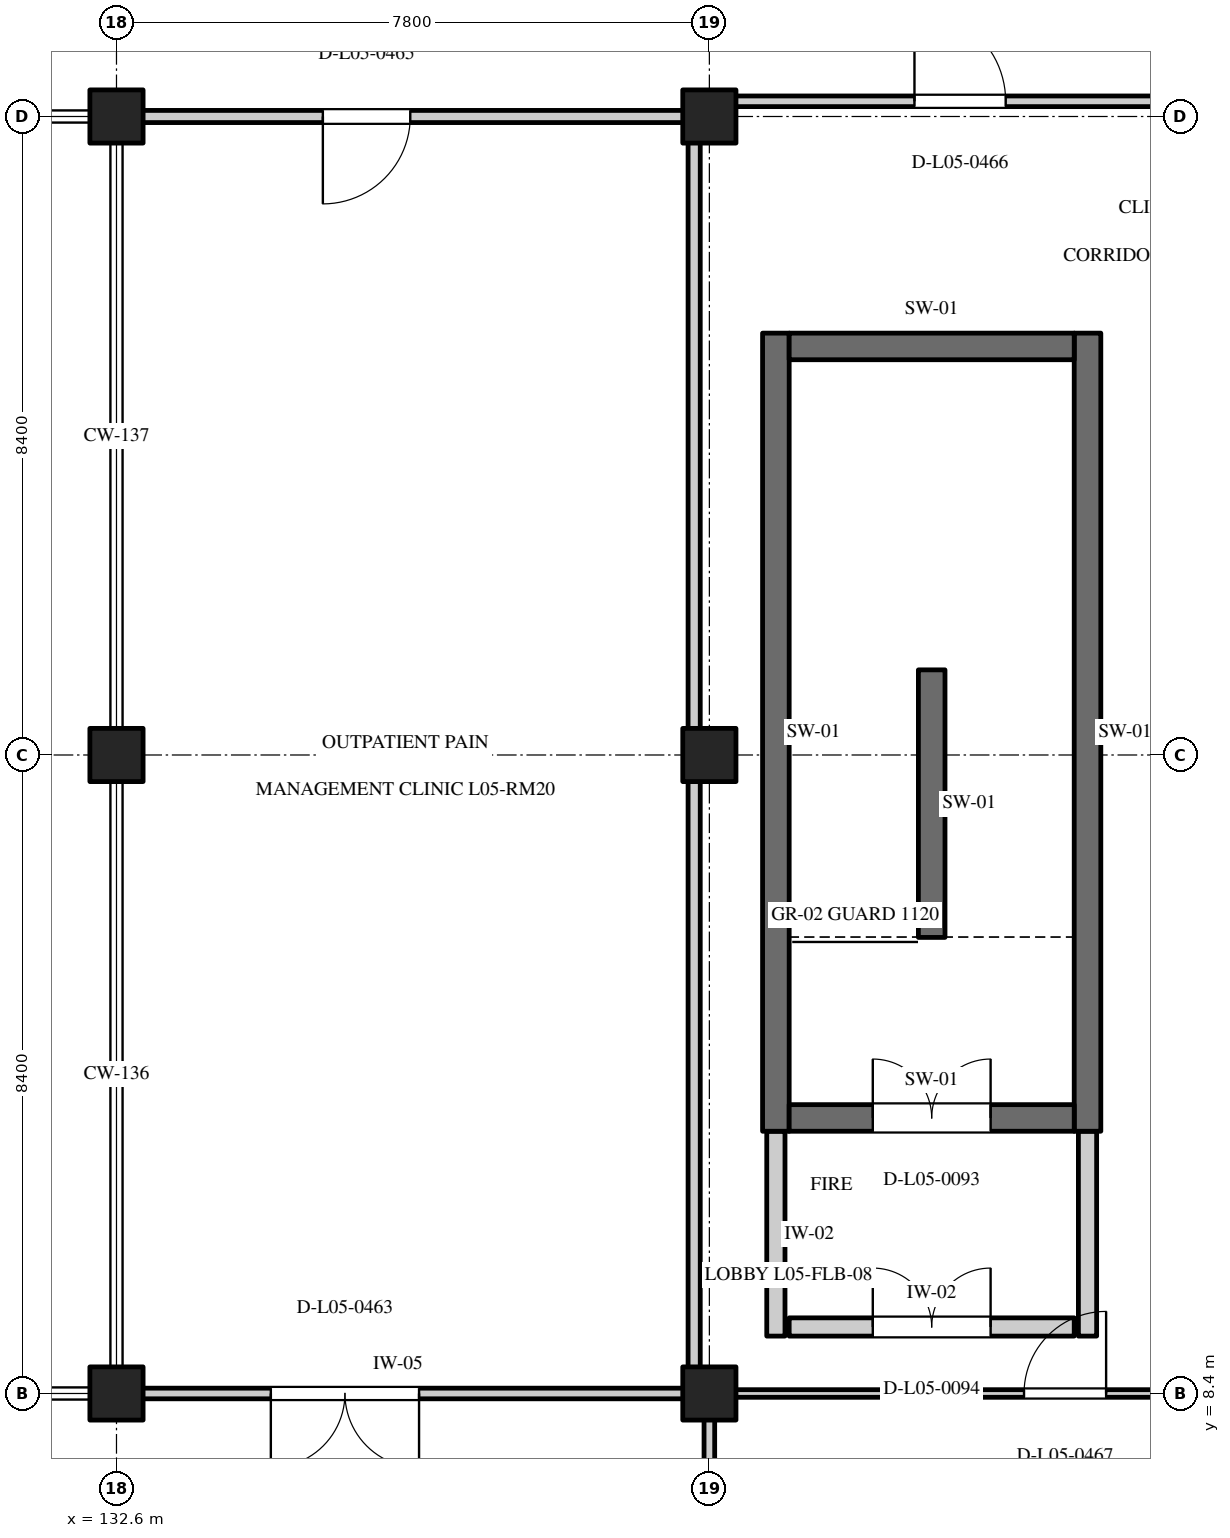
"""IFC4 building model, lengths in metres.
Left out: names, types, materials, properties, quantities, classifications, styles, units other than length and angle.
Written with IfcOpenShell. Run it as: python <this file> out.ifc"""

import sys

from ifc_helpers import new_model, si_unit, direction, frame, frame_2d, origin, origin_2d, place, context, subcontext, project, spatial, rectangle, extrude, element, fill, save


model = new_model("IFC4")
c1 = context("Model", 3, precision=1e-05, world=origin(), true_north=direction((0.0, 1.0)))
c2 = subcontext(c1, "Body", "Model", "MODEL_VIEW")
j1 = project(units=[si_unit("LENGTHUNIT", "METRE"), si_unit("PLANEANGLEUNIT", "RADIAN")], contexts=[c1])
p1 = place(None, origin())
s1 = spatial("IfcSite", under=j1, at=p1, CompositionType="ELEMENT")
p2 = place(p1, origin())
s2 = spatial("IfcBuilding", under=s1, at=p2, CompositionType="ELEMENT")
p3 = place(p2, frame((0.0, 0.0, 22.2)))
s3 = spatial("IfcBuildingStorey", under=s2, at=p3, CompositionType="ELEMENT", Elevation=22.2)
for number, where, z_axis, x_axis in (
    (1, (132.6, 8.4, 0.0), (0.0, 0.0, 1.0), (1.0, 0.0, 0.0)),
    (2, (132.6, 16.8, 0.0), (0.0, 0.0, 1.0), (1.0, 0.0, 0.0)),
    (3, (132.6, 25.2, 0.0), (0.0, 0.0, 1.0), (1.0, 0.0, 0.0)),
    (4, (140.4, 8.4, 0.0), (0.0, 0.0, 1.0), (1.0, 0.0, 0.0)),
    (5, (140.4, 16.8, 0.0), (0.0, 0.0, 1.0), (1.0, 0.0, 0.0)),
    (6, (140.4, 25.2, 0.0), (0.0, 0.0, 1.0), (1.0, 0.0, 0.0)),
):
    element("IfcColumn", number, at=place(p3, frame(where, z_axis=z_axis, x_axis=x_axis)), inside=s3, PredefinedType="COLUMN", context=c2, shape_type="SweptSolid", body=[
        extrude(rectangle(XDim=0.7, YDim=0.7, at=origin_2d()), origin(), (0.0, 0.0, 1.0), 3.9),
    ])
for number, where, z_axis, x_axis in (
    (7, (141.275, 11.85, 0.0), (0.0, 0.0, 1.0), (0.0, 1.0, 0.0)),
    (8, (145.375, 11.85, 0.0), (0.0, 0.0, 1.0), (0.0, 1.0, 0.0)),
):
    element("IfcWall", number, at=place(p3, frame(where, z_axis=z_axis, x_axis=x_axis)), inside=s3, PredefinedType="SHEAR", context=c2, shape_type="SweptSolid", body=[
        extrude(rectangle(XDim=10.5, YDim=0.35, at=frame_2d((5.25, 0.0))), origin(), (0.0, 0.0, 1.0), 3.6),
    ])
p4 = place(p3, frame((141.45, 22.175, 0.0), z_axis=(0.0, 0.0, 1.0), x_axis=(1.0, 0.0, 0.0)))
e9 = element("IfcWall", 9, at=p4, inside=s3, PredefinedType="SHEAR", context=c2, shape_type="SweptSolid", body=[
    extrude(rectangle(XDim=3.75, YDim=0.35, at=frame_2d((1.875, 0.0))), origin(), (0.0, 0.0, 1.0), 3.6),
])
p5 = place(p3, frame((141.45, 12.025, 0.0), z_axis=(0.0, 0.0, 1.0), x_axis=(1.0, 0.0, 0.0)))
e10 = element("IfcWall", 10, at=p5, inside=s3, PredefinedType="SHEAR", context=c2, shape_type="SweptSolid", body=[
    extrude(rectangle(XDim=3.75, YDim=0.35, at=frame_2d((1.875, 0.0))), origin(), (0.0, 0.0, 1.0), 3.6),
])
p6 = place(p5, frame((1.1, 0.0, 0.0)))
e11 = element("IfcOpeningElement", 11, at=p6, cuts=e10, PredefinedType="OPENING", context=c2, shape_type="SweptSolid", body=[
    extrude(rectangle(XDim=1.55, YDim=2.25, at=frame_2d((0.775, 1.125))), frame((0.0, 0.187, 0.0), z_axis=(0.0, -1.0, 0.0), x_axis=(1.0, 0.0, 0.0)), (0.0, 0.0, 1.0), 0.374),
])
for number, where, z_axis, x_axis in (
    (12, (141.275, 9.155, 0.0), (0.0, 0.0, 1.0), (0.0, 1.0, 0.0)),
    (13, (145.375, 9.155, 0.0), (0.0, 0.0, 1.0), (0.0, 1.0, 0.0)),
):
    element("IfcWall", number, at=place(p3, frame(where, z_axis=z_axis, x_axis=x_axis)), inside=s3, PredefinedType="STANDARD", context=c2, shape_type="SweptSolid", body=[
        extrude(rectangle(XDim=2.695, YDim=0.24, at=frame_2d((1.348, 0.0))), origin(), (0.0, 0.0, 1.0), 3.6),
    ])
p7 = place(p3, frame((141.45, 9.275, 0.0), z_axis=(0.0, 0.0, 1.0), x_axis=(1.0, 0.0, 0.0)))
e14 = element("IfcWall", 14, at=p7, inside=s3, PredefinedType="STANDARD", context=c2, shape_type="SweptSolid", body=[
    extrude(rectangle(XDim=3.75, YDim=0.24, at=frame_2d((1.875, 0.0))), origin(), (0.0, 0.0, 1.0), 3.6),
])
p8 = place(p7, frame((1.1, 0.0, 0.0)))
e15 = element("IfcOpeningElement", 15, at=p8, cuts=e14, PredefinedType="OPENING", context=c2, shape_type="SweptSolid", body=[
    extrude(rectangle(XDim=1.55, YDim=2.25, at=frame_2d((0.775, 1.125))), frame((0.0, 0.132, 0.0), z_axis=(0.0, -1.0, 0.0), x_axis=(1.0, 0.0, 0.0)), (0.0, 0.0, 1.0), 0.264),
])
p9 = place(p3, frame((143.325, 14.4, 0.0), z_axis=(0.0, 0.0, 1.0), x_axis=(0.0, 1.0, 0.0)))
e16 = element("IfcWall", 16, at=p9, inside=s3, PredefinedType="SHEAR", context=c2, shape_type="SweptSolid", body=[
    extrude(rectangle(XDim=3.52, YDim=0.35, at=frame_2d((1.76, 0.0))), origin(), (0.0, 0.0, 1.0), 3.6),
])
p10 = place(p3, frame((132.29, 8.4, 0.0), z_axis=(0.0, 0.0, 1.0), x_axis=(1.0, 0.0, 0.0)))
e17 = element("IfcWall", 17, at=p10, inside=s3, PredefinedType="PARTITIONING", context=c2, shape_type="SweptSolid", body=[
    extrude(rectangle(XDim=8.025, YDim=0.14, at=frame_2d((4.012, 0.0))), origin(), (0.0, 0.0, 1.0), 3.58),
])
p11 = place(p10, frame((2.341, 0.0, 0.0)))
e18 = element("IfcOpeningElement", 18, at=p11, cuts=e17, PredefinedType="OPENING", context=c2, shape_type="SweptSolid", body=[
    extrude(rectangle(XDim=1.95, YDim=2.35, at=frame_2d((0.975, 1.175))), frame((0.0, 0.082, 0.0), z_axis=(0.0, -1.0, 0.0), x_axis=(1.0, 0.0, 0.0)), (0.0, 0.0, 1.0), 0.164),
])
p12 = place(p3, frame((140.4, 0.085, 0.0), z_axis=(0.0, 0.0, 1.0), x_axis=(0.0, 1.0, 0.0)))
e19 = element("IfcWall", 19, at=p12, inside=s3, PredefinedType="PARTITIONING", context=c2, shape_type="SweptSolid", body=[
    extrude(rectangle(XDim=8.23, YDim=0.14, at=frame_2d((4.115, 0.0))), origin(), (0.0, 0.0, 1.0), 3.58),
])
p13 = place(p3, frame((132.685, 25.2, 0.0), z_axis=(0.0, 0.0, 1.0), x_axis=(1.0, 0.0, 0.0)))
e20 = element("IfcWall", 20, at=p13, inside=s3, PredefinedType="PARTITIONING", context=c2, shape_type="SweptSolid", body=[
    extrude(rectangle(XDim=7.43, YDim=0.16, at=frame_2d((3.715, 0.0))), origin(), (0.0, 0.0, 1.0), 2.95),
])
p14 = place(p13, frame((2.63, 0.0, 0.0)))
e21 = element("IfcOpeningElement", 21, at=p14, cuts=e20, PredefinedType="OPENING", context=c2, shape_type="SweptSolid", body=[
    extrude(rectangle(XDim=1.15, YDim=2.15, at=frame_2d((0.575, 1.075))), frame((0.0, 0.092, 0.0), z_axis=(0.0, -1.0, 0.0), x_axis=(1.0, 0.0, 0.0)), (0.0, 0.0, 1.0), 0.184),
])
p15 = place(p3, frame((132.6, 16.49, 0.0), z_axis=(0.0, 0.0, 1.0), x_axis=(0.0, 1.0, 0.0)))
e22 = element("IfcWall", 22, at=p15, inside=s3, PredefinedType="PARTITIONING", context=c2, shape_type="SweptSolid", body=[
    extrude(rectangle(XDim=0.62, YDim=0.16, at=frame_2d((0.31, 0.0))), origin(), (0.0, 0.0, 1.0), 2.95),
])
p16 = place(p3, frame((140.2, 8.485, 0.0), z_axis=(0.0, 0.0, 1.0), x_axis=(0.0, 1.0, 0.0)))
e23 = element("IfcWall", 23, at=p16, inside=s3, PredefinedType="PARTITIONING", context=c2, shape_type="SweptSolid", body=[
    extrude(rectangle(XDim=16.63, YDim=0.16, at=frame_2d((8.315, 0.0))), origin(), (0.0, 0.0, 1.0), 3.58),
])
p17 = place(p3, frame((140.155, 25.4, 0.0), z_axis=(0.0, 0.0, 1.0), x_axis=(1.0, 0.0, 0.0)))
e24 = element("IfcWall", 24, at=p17, inside=s3, PredefinedType="PARTITIONING", context=c2, shape_type="SweptSolid", body=[
    extrude(rectangle(XDim=7.76, YDim=0.14, at=frame_2d((3.88, 0.0))), origin(), (0.0, 0.0, 1.0), 2.95),
])
p18 = place(p17, frame((2.943, 0.0, 0.0)))
e25 = element("IfcOpeningElement", 25, at=p18, cuts=e24, PredefinedType="OPENING", context=c2, shape_type="SweptSolid", body=[
    extrude(rectangle(XDim=1.2, YDim=2.15, at=frame_2d((0.6, 1.075))), frame((0.0, 0.082, 0.0), z_axis=(0.0, -1.0, 0.0), x_axis=(1.0, 0.0, 0.0)), (0.0, 0.0, 1.0), 0.164),
])
p19 = place(p3, frame((140.485, 8.4, 0.0), z_axis=(0.0, 0.0, 1.0), x_axis=(1.0, 0.0, 0.0)))
e26 = element("IfcWall", 26, at=p19, inside=s3, PredefinedType="PARTITIONING", context=c2, shape_type="SweptSolid", body=[
    extrude(rectangle(XDim=7.43, YDim=0.1, at=frame_2d((3.715, 0.0))), origin(), (0.0, 0.0, 1.0), 3.58),
])
p20 = place(p19, frame((4.055, 0.0, 0.0)))
e27 = element("IfcOpeningElement", 27, at=p20, cuts=e26, PredefinedType="OPENING", context=c2, shape_type="SweptSolid", body=[
    extrude(rectangle(XDim=1.08, YDim=2.15, at=frame_2d((0.54, 1.075))), frame((0.0, 0.062, 0.0), z_axis=(0.0, -1.0, 0.0), x_axis=(1.0, 0.0, 0.0)), (0.0, 0.0, 1.0), 0.124),
])
p21 = place(p6, origin())
e28 = element("IfcDoor", 28, at=p21, inside=s3, OperationType="DOUBLE_DOOR_SINGLE_SWING", PredefinedType="DOOR", context=c2, shape_type="SweptSolid", body=[
    extrude(rectangle(XDim=1.55, YDim=2.25, at=frame_2d((0.775, 1.125))), frame((0.0, 0.025, 0.0), z_axis=(0.0, -1.0, 0.0), x_axis=(1.0, 0.0, 0.0)), (0.0, 0.0, 1.0), 0.05),
])
fill(e11, e28)
p22 = place(p8, origin())
e29 = element("IfcDoor", 29, at=p22, inside=s3, OperationType="DOUBLE_DOOR_SINGLE_SWING", PredefinedType="DOOR", context=c2, shape_type="SweptSolid", body=[
    extrude(rectangle(XDim=1.55, YDim=2.25, at=frame_2d((0.775, 1.125))), frame((0.0, 0.025, 0.0), z_axis=(0.0, -1.0, 0.0), x_axis=(1.0, 0.0, 0.0)), (0.0, 0.0, 1.0), 0.05),
])
fill(e15, e29)
p23 = place(p11, frame((1.95, 0.0, 0.0), z_axis=(0.0, 0.0, 1.0), x_axis=(-1.0, 0.0, 0.0)))
e30 = element("IfcDoor", 30, at=p23, inside=s3, OperationType="DOUBLE_DOOR_SINGLE_SWING", PredefinedType="DOOR", context=c2, shape_type="SweptSolid", body=[
    extrude(rectangle(XDim=1.95, YDim=2.35, at=frame_2d((0.975, 1.175))), frame((0.0, 0.025, 0.0), z_axis=(0.0, -1.0, 0.0), x_axis=(1.0, 0.0, 0.0)), (0.0, 0.0, 1.0), 0.05),
])
fill(e18, e30)
p24 = place(p14, frame((1.15, 0.0, 0.0), z_axis=(0.0, 0.0, 1.0), x_axis=(-1.0, 0.0, 0.0)))
e31 = element("IfcDoor", 31, at=p24, inside=s3, OperationType="SINGLE_SWING_RIGHT", PredefinedType="DOOR", context=c2, shape_type="SweptSolid", body=[
    extrude(rectangle(XDim=1.15, YDim=2.15, at=frame_2d((0.575, 1.075))), frame((0.0, 0.025, 0.0), z_axis=(0.0, -1.0, 0.0), x_axis=(1.0, 0.0, 0.0)), (0.0, 0.0, 1.0), 0.05),
])
fill(e21, e31)
p25 = place(p18, origin())
e32 = element("IfcDoor", 32, at=p25, inside=s3, OperationType="SINGLE_SWING_LEFT", PredefinedType="DOOR", context=c2, shape_type="SweptSolid", body=[
    extrude(rectangle(XDim=1.2, YDim=2.15, at=frame_2d((0.6, 1.075))), frame((0.0, 0.025, 0.0), z_axis=(0.0, -1.0, 0.0), x_axis=(1.0, 0.0, 0.0)), (0.0, 0.0, 1.0), 0.05),
])
fill(e25, e32)
p26 = place(p20, frame((1.08, 0.0, 0.0), z_axis=(0.0, 0.0, 1.0), x_axis=(-1.0, 0.0, 0.0)))
e33 = element("IfcDoor", 33, at=p26, inside=s3, OperationType="SINGLE_SWING_LEFT", PredefinedType="DOOR", context=c2, shape_type="SweptSolid", body=[
    extrude(rectangle(XDim=1.08, YDim=2.15, at=frame_2d((0.54, 1.075))), frame((0.0, 0.025, 0.0), z_axis=(0.0, -1.0, 0.0), x_axis=(1.0, 0.0, 0.0)), (0.0, 0.0, 1.0), 0.05),
])
fill(e27, e33)
save(model, sys.argv[1])
